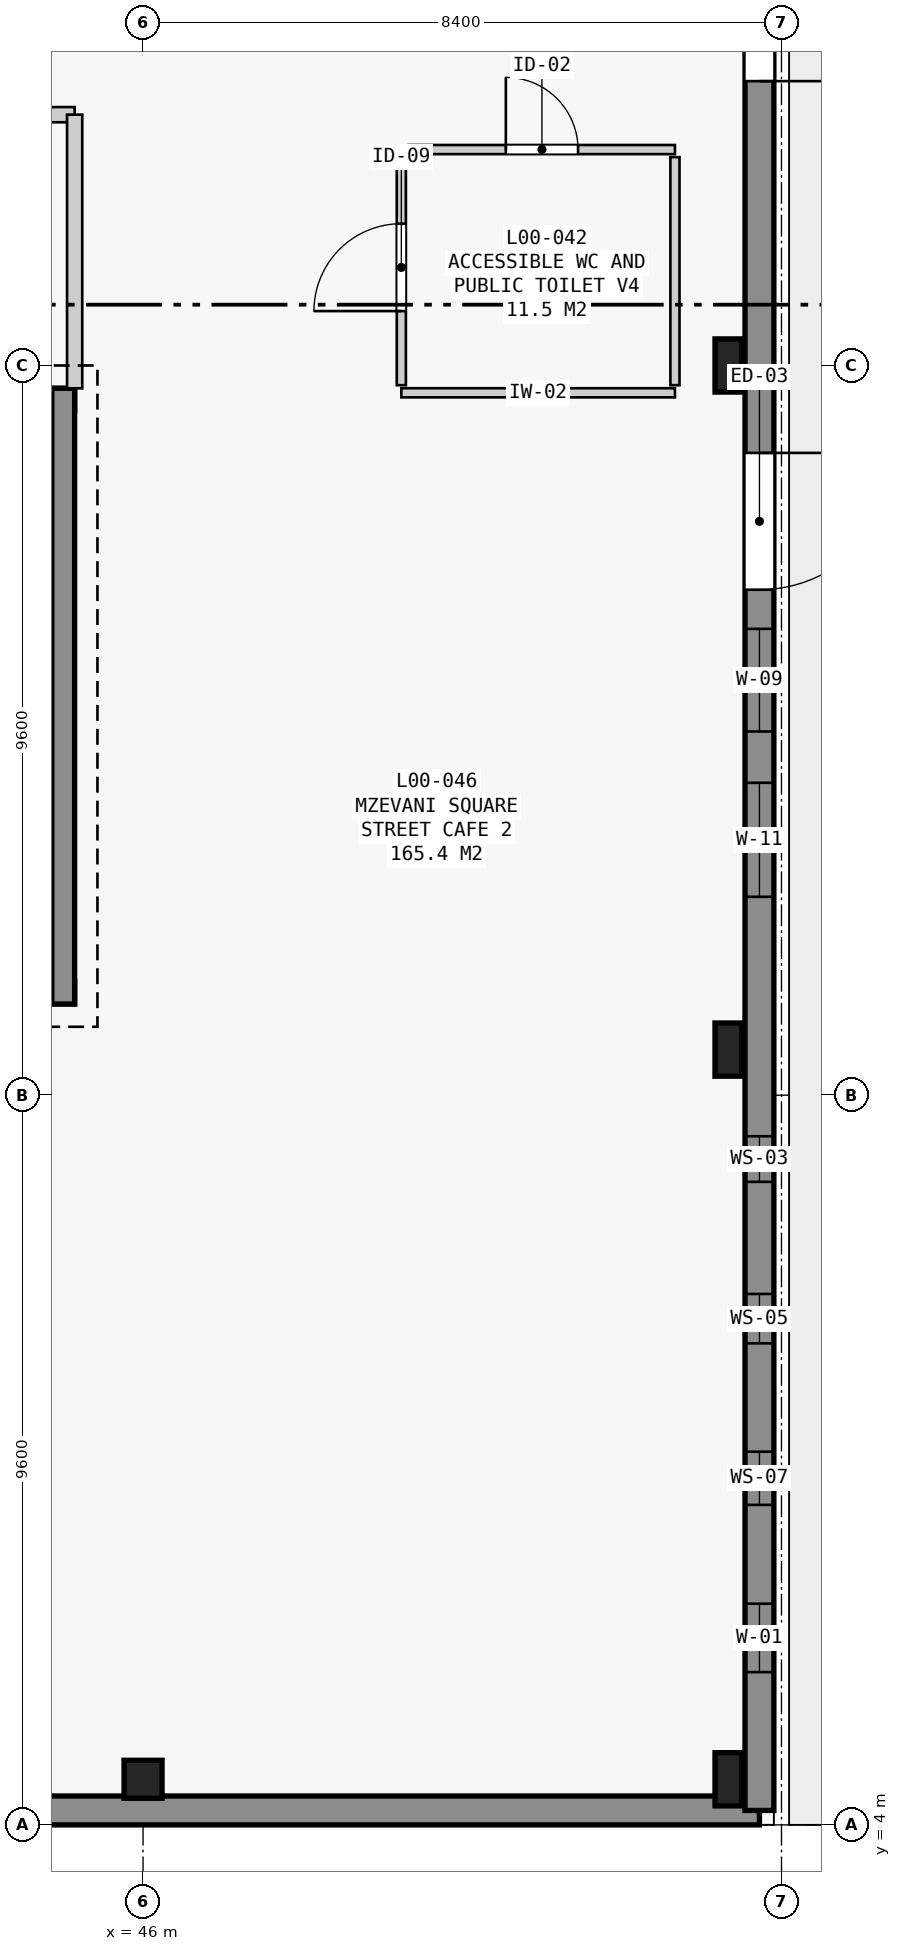
"""IFC4 building model, lengths in metres.
Left out: names, types, materials, properties, quantities, classifications, styles, units other than length and angle.
Written with IfcOpenShell. Run it as: python <this file> out.ifc"""

import sys

from ifc_helpers import new_model, si_unit, direction, frame, frame_2d, origin, origin_2d, place, context, subcontext, project, spatial, rectangle, extrude, element, fill, save


model = new_model("IFC4")
c1 = context("Model", 3, precision=1e-05, world=origin(), true_north=direction((0.0, 1.0)))
c2 = subcontext(c1, "Body", "Model", "MODEL_VIEW")
j1 = project(units=[si_unit("LENGTHUNIT", "METRE"), si_unit("PLANEANGLEUNIT", "RADIAN")], contexts=[c1])
p1 = place(None, origin())
s1 = spatial("IfcSite", under=j1, at=p1, CompositionType="ELEMENT")
p2 = place(p1, origin())
s2 = spatial("IfcBuilding", under=s1, at=p2, CompositionType="ELEMENT")
p3 = place(p2, origin())
s3 = spatial("IfcBuildingStorey", under=s2, at=p3, CompositionType="ELEMENT", Elevation=0.0)
p4 = place(p3, frame((46.0, 4.6, 0.0), z_axis=(0.0, 0.0, 1.0), x_axis=(1.0, 0.0, 0.0)))
e1 = element("IfcColumn", 1, at=p4, inside=s3, PredefinedType="COLUMN", context=c2, shape_type="SweptSolid", body=[
    extrude(rectangle(XDim=0.5, YDim=0.5, at=origin_2d()), origin(), (0.0, 0.0, 1.0), 5.4),
])
for number, where, z_axis, x_axis in (
    (2, (53.7, 4.6, 0.0), (0.0, 0.0, 1.0), (1.0, 0.0, 0.0)),
    (3, (53.7, 14.2, 0.0), (0.0, 0.0, 1.0), (1.0, 0.0, 0.0)),
    (4, (53.7, 23.2, 0.0), (0.0, 0.0, 1.0), (1.0, 0.0, 0.0)),
):
    element("IfcColumn", number, at=place(p3, frame(where, z_axis=z_axis, x_axis=x_axis)), inside=s3, PredefinedType="COLUMN", context=c2, shape_type="SweptSolid", body=[
        extrude(rectangle(XDim=0.35, YDim=0.7, at=origin_2d()), origin(), (0.0, 0.0, 1.0), 5.4),
    ])
p5 = place(p3, frame((54.11, 4.19, 0.0), z_axis=(0.0, 0.0, 1.0), x_axis=(-1.0, 0.0, 0.0)))
e5 = element("IfcWall", 5, at=p5, inside=s3, PredefinedType="STANDARD", context=c2, shape_type="SweptSolid", body=[
    extrude(rectangle(XDim=24.72, YDim=0.38, at=frame_2d((12.36, 0.0))), origin(), (0.0, 0.0, 1.0), 5.14),
])
p6 = place(p5, frame((11.61, 0.0, 0.0)))
e6 = element("IfcOpeningElement", 6, at=p6, cuts=e5, PredefinedType="OPENING", context=c2, shape_type="SweptSolid", body=[
    extrude(rectangle(XDim=1.5, YDim=2.3, at=frame_2d((0.75, 1.15))), frame((0.0, 0.2, 0.0), z_axis=(0.0, -1.0, 0.0), x_axis=(1.0, 0.0, 0.0)), (0.0, 0.0, 1.0), 0.4),
])
p7 = place(p3, frame((54.11, 42.11, 0.0), z_axis=(0.0, 0.0, 1.0), x_axis=(0.0, -1.0, 0.0)))
e7 = element("IfcWall", 7, at=p7, inside=s3, PredefinedType="STANDARD", context=c2, shape_type="SweptSolid", body=[
    extrude(rectangle(XDim=37.92, YDim=0.38, at=frame_2d((18.96, 0.0))), origin(), (0.0, 0.0, 1.0), 5.14),
])
p8 = place(p7, frame((13.669, 0.0, 0.0)))
e8 = element("IfcOpeningElement", 8, at=p8, cuts=e7, PredefinedType="OPENING", context=c2, shape_type="SweptSolid", body=[
    extrude(rectangle(XDim=1.5, YDim=2.3, at=frame_2d((0.75, 1.15))), frame((0.0, 0.2, 0.0), z_axis=(0.0, -1.0, 0.0), x_axis=(1.0, 0.0, 0.0)), (0.0, 0.0, 1.0), 0.4),
])
p9 = place(p7, frame((20.06, 0.0, 0.0)))
e9 = element("IfcOpeningElement", 9, at=p9, cuts=e7, PredefinedType="OPENING", context=c2, shape_type="SweptSolid", body=[
    extrude(rectangle(XDim=1.8, YDim=2.4, at=frame_2d((0.9, 1.2))), frame((0.0, 0.2, 0.0), z_axis=(0.0, -1.0, 0.0), x_axis=(1.0, 0.0, 0.0)), (0.0, 0.0, 1.0), 0.4),
])
p10 = place(p7, frame((1.75, 0.0, 0.95)))
e10 = element("IfcOpeningElement", 10, at=p10, cuts=e7, PredefinedType="OPENING", context=c2, shape_type="SweptSolid", body=[
    extrude(rectangle(XDim=0.6, YDim=1.9, at=frame_2d((0.3, 0.95))), frame((0.0, 0.2, 0.0), z_axis=(0.0, -1.0, 0.0), x_axis=(1.0, 0.0, 0.0)), (0.0, 0.0, 1.0), 0.4),
])
p11 = place(p7, frame((3.825, 0.0, 0.95)))
e11 = element("IfcOpeningElement", 11, at=p11, cuts=e7, PredefinedType="OPENING", context=c2, shape_type="SweptSolid", body=[
    extrude(rectangle(XDim=0.65, YDim=2.0, at=frame_2d((0.325, 1.0))), frame((0.0, 0.2, 0.0), z_axis=(0.0, -1.0, 0.0), x_axis=(1.0, 0.0, 0.0)), (0.0, 0.0, 1.0), 0.4),
])
p12 = place(p7, frame((5.9, 0.0, 0.95)))
e12 = element("IfcOpeningElement", 12, at=p12, cuts=e7, PredefinedType="OPENING", context=c2, shape_type="SweptSolid", body=[
    extrude(rectangle(XDim=0.7, YDim=2.1, at=frame_2d((0.35, 1.05))), frame((0.0, 0.2, 0.0), z_axis=(0.0, -1.0, 0.0), x_axis=(1.0, 0.0, 0.0)), (0.0, 0.0, 1.0), 0.4),
])
p13 = place(p7, frame((10.0, 0.0, 0.95)))
e13 = element("IfcOpeningElement", 13, at=p13, cuts=e7, PredefinedType="OPENING", context=c2, shape_type="SweptSolid", body=[
    extrude(rectangle(XDim=0.9, YDim=2.2, at=frame_2d((0.45, 1.1))), frame((0.0, 0.2, 0.0), z_axis=(0.0, -1.0, 0.0), x_axis=(1.0, 0.0, 0.0)), (0.0, 0.0, 1.0), 0.4),
])
p14 = place(p7, frame((22.375, 0.0, 0.95)))
e14 = element("IfcOpeningElement", 14, at=p14, cuts=e7, PredefinedType="OPENING", context=c2, shape_type="SweptSolid", body=[
    extrude(rectangle(XDim=1.35, YDim=2.5, at=frame_2d((0.675, 1.25))), frame((0.0, 0.2, 0.0), z_axis=(0.0, -1.0, 0.0), x_axis=(1.0, 0.0, 0.0)), (0.0, 0.0, 1.0), 0.4),
])
p15 = place(p7, frame((24.4, 0.0, 0.95)))
e15 = element("IfcOpeningElement", 15, at=p15, cuts=e7, PredefinedType="OPENING", context=c2, shape_type="SweptSolid", body=[
    extrude(rectangle(XDim=1.5, YDim=2.2, at=frame_2d((0.75, 1.1))), frame((0.0, 0.2, 0.0), z_axis=(0.0, -1.0, 0.0), x_axis=(1.0, 0.0, 0.0)), (0.0, 0.0, 1.0), 0.4),
])
p16 = place(p7, frame((29.05, 0.0, 0.95)))
e16 = element("IfcOpeningElement", 16, at=p16, cuts=e7, PredefinedType="OPENING", context=c2, shape_type="SweptSolid", body=[
    extrude(rectangle(XDim=0.6, YDim=1.9, at=frame_2d((0.3, 0.95))), frame((0.0, 0.2, 0.0), z_axis=(0.0, -1.0, 0.0), x_axis=(1.0, 0.0, 0.0)), (0.0, 0.0, 1.0), 0.4),
])
p17 = place(p7, frame((31.125, 0.0, 0.95)))
e17 = element("IfcOpeningElement", 17, at=p17, cuts=e7, PredefinedType="OPENING", context=c2, shape_type="SweptSolid", body=[
    extrude(rectangle(XDim=0.65, YDim=2.0, at=frame_2d((0.325, 1.0))), frame((0.0, 0.2, 0.0), z_axis=(0.0, -1.0, 0.0), x_axis=(1.0, 0.0, 0.0)), (0.0, 0.0, 1.0), 0.4),
])
p18 = place(p7, frame((33.2, 0.0, 0.95)))
e18 = element("IfcOpeningElement", 18, at=p18, cuts=e7, PredefinedType="OPENING", context=c2, shape_type="SweptSolid", body=[
    extrude(rectangle(XDim=0.7, YDim=2.1, at=frame_2d((0.35, 1.05))), frame((0.0, 0.2, 0.0), z_axis=(0.0, -1.0, 0.0), x_axis=(1.0, 0.0, 0.0)), (0.0, 0.0, 1.0), 0.4),
])
p19 = place(p7, frame((35.2, 0.0, 0.95)))
e19 = element("IfcOpeningElement", 19, at=p19, cuts=e7, PredefinedType="OPENING", context=c2, shape_type="SweptSolid", body=[
    extrude(rectangle(XDim=0.9, YDim=1.8, at=frame_2d((0.45, 0.9))), frame((0.0, 0.2, 0.0), z_axis=(0.0, -1.0, 0.0), x_axis=(1.0, 0.0, 0.0)), (0.0, 0.0, 1.0), 0.4),
])
p20 = place(p3, frame((45.1, 14.95, 0.0), z_axis=(0.0, 0.0, 1.0), x_axis=(-1.0, 0.0, 0.0)))
e20 = element("IfcWall", 20, at=p20, inside=s3, PredefinedType="SHEAR", context=c2, shape_type="SweptSolid", body=[
    extrude(rectangle(XDim=6.4, YDim=0.3, at=frame_2d((3.2, 0.0))), origin(), (0.0, 0.0, 1.0), 5.14),
])
p21 = place(p3, frame((38.7, 22.75, 0.0), z_axis=(0.0, 0.0, 1.0), x_axis=(1.0, 0.0, 0.0)))
e21 = element("IfcWall", 21, at=p21, inside=s3, PredefinedType="SHEAR", context=c2, shape_type="SweptSolid", body=[
    extrude(rectangle(XDim=6.4, YDim=0.3, at=frame_2d((3.2, 0.0))), origin(), (0.0, 0.0, 1.0), 5.14),
])
p22 = place(p21, frame((1.25, 0.0, 0.0)))
e22 = element("IfcOpeningElement", 22, at=p22, cuts=e21, PredefinedType="OPENING", context=c2, shape_type="SweptSolid", body=[
    extrude(rectangle(XDim=1.3, YDim=2.2, at=frame_2d((0.65, 1.1))), frame((0.0, 0.16, 0.0), z_axis=(0.0, -1.0, 0.0), x_axis=(1.0, 0.0, 0.0)), (0.0, 0.0, 1.0), 0.32),
])
p23 = place(p21, frame((4.45, 0.0, 0.0)))
e23 = element("IfcOpeningElement", 23, at=p23, cuts=e21, PredefinedType="OPENING", context=c2, shape_type="SweptSolid", body=[
    extrude(rectangle(XDim=1.0, YDim=2.15, at=frame_2d((0.5, 1.075))), frame((0.0, 0.16, 0.0), z_axis=(0.0, -1.0, 0.0), x_axis=(1.0, 0.0, 0.0)), (0.0, 0.0, 1.0), 0.32),
])
p24 = place(p3, frame((44.95, 22.9, 0.0), z_axis=(0.0, 0.0, 1.0), x_axis=(0.0, -1.0, 0.0)))
e24 = element("IfcWall", 24, at=p24, inside=s3, PredefinedType="SHEAR", context=c2, shape_type="SweptSolid", body=[
    extrude(rectangle(XDim=8.1, YDim=0.3, at=frame_2d((4.05, 0.0))), origin(), (0.0, 0.0, 1.0), 5.14),
])
p25 = place(p3, frame((38.7, 26.5, 0.0), z_axis=(0.0, 0.0, 1.0), x_axis=(1.0, 0.0, 0.0)))
e25 = element("IfcWall", 25, at=p25, inside=s3, PredefinedType="STANDARD", context=c2, shape_type="SweptSolid", body=[
    extrude(rectangle(XDim=6.4, YDim=0.2, at=frame_2d((3.2, 0.0))), origin(), (0.0, 0.0, 1.0), 4.67),
])
p26 = place(p25, frame((2.4, 0.0, 0.0)))
e26 = element("IfcOpeningElement", 26, at=p26, cuts=e25, PredefinedType="OPENING", context=c2, shape_type="SweptSolid", body=[
    extrude(rectangle(XDim=1.6, YDim=2.2, at=frame_2d((0.8, 1.1))), frame((0.0, 0.11, 0.0), z_axis=(0.0, -1.0, 0.0), x_axis=(1.0, 0.0, 0.0)), (0.0, 0.0, 1.0), 0.22),
])
p27 = place(p3, frame((45.1, 26.5, 0.0), z_axis=(0.0, 0.0, 1.0), x_axis=(0.0, -1.0, 0.0)))
e27 = element("IfcWall", 27, at=p27, inside=s3, PredefinedType="STANDARD", context=c2, shape_type="SweptSolid", body=[
    extrude(rectangle(XDim=3.6, YDim=0.2, at=frame_2d((1.8, 0.0))), origin(), (0.0, 0.0, 1.0), 4.37),
])
p28 = place(p3, frame((52.998, 22.841, 0.0), z_axis=(0.0, 0.0, 1.0), x_axis=(-1.0, 0.0, 0.0)))
e28 = element("IfcWall", 28, at=p28, inside=s3, PredefinedType="PARTITIONING", context=c2, shape_type="SweptSolid", body=[
    extrude(rectangle(XDim=3.6, YDim=0.12, at=frame_2d((1.8, 0.0))), origin(), (0.0, 0.0, 1.0), 5.14),
])
p29 = place(p3, frame((49.398, 22.941, 0.0), z_axis=(0.0, 0.0, 1.0), x_axis=(0.0, 1.0, 0.0)))
e29 = element("IfcWall", 29, at=p29, inside=s3, PredefinedType="PARTITIONING", context=c2, shape_type="SweptSolid", body=[
    extrude(rectangle(XDim=3.1, YDim=0.12, at=frame_2d((1.55, 0.0))), origin(), (0.0, 0.0, 1.0), 4.37),
])
p30 = place(p29, frame((0.975, 0.0, 0.0)))
e30 = element("IfcOpeningElement", 30, at=p30, cuts=e29, PredefinedType="OPENING", context=c2, shape_type="SweptSolid", body=[
    extrude(rectangle(XDim=1.15, YDim=2.2, at=frame_2d((0.575, 1.1))), frame((0.0, 0.07, 0.0), z_axis=(0.0, -1.0, 0.0), x_axis=(1.0, 0.0, 0.0)), (0.0, 0.0, 1.0), 0.14),
])
p31 = place(p3, frame((49.498, 26.041, 0.0), z_axis=(0.0, 0.0, 1.0), x_axis=(1.0, 0.0, 0.0)))
e31 = element("IfcWall", 31, at=p31, inside=s3, PredefinedType="PARTITIONING", context=c2, shape_type="SweptSolid", body=[
    extrude(rectangle(XDim=3.5, YDim=0.12, at=frame_2d((1.75, 0.0))), origin(), (0.0, 0.0, 1.0), 5.14),
])
p32 = place(p31, frame((1.275, 0.0, 0.0)))
e32 = element("IfcOpeningElement", 32, at=p32, cuts=e31, PredefinedType="OPENING", context=c2, shape_type="SweptSolid", body=[
    extrude(rectangle(XDim=0.95, YDim=2.15, at=frame_2d((0.475, 1.075))), frame((0.0, 0.07, 0.0), z_axis=(0.0, -1.0, 0.0), x_axis=(1.0, 0.0, 0.0)), (0.0, 0.0, 1.0), 0.14),
])
p33 = place(p3, frame((52.998, 25.941, 0.0), z_axis=(0.0, 0.0, 1.0), x_axis=(0.0, -1.0, 0.0)))
e33 = element("IfcWall", 33, at=p33, inside=s3, PredefinedType="PARTITIONING", context=c2, shape_type="SweptSolid", body=[
    extrude(rectangle(XDim=3.0, YDim=0.12, at=frame_2d((1.5, 0.0))), origin(), (0.0, 0.0, 1.0), 4.37),
])
p34 = place(p8, origin())
e34 = element("IfcDoor", 34, at=p34, inside=s3, OperationType="SINGLE_SWING_RIGHT", PredefinedType="DOOR", context=c2, shape_type="SweptSolid", body=[
    extrude(rectangle(XDim=1.5, YDim=2.3, at=frame_2d((0.75, 1.15))), frame((0.0, 0.025, 0.0), z_axis=(0.0, -1.0, 0.0), x_axis=(1.0, 0.0, 0.0)), (0.0, 0.0, 1.0), 0.05),
])
fill(e8, e34)
p35 = place(p9, origin())
e35 = element("IfcDoor", 35, at=p35, inside=s3, OperationType="SINGLE_SWING_LEFT", PredefinedType="DOOR", context=c2, shape_type="SweptSolid", body=[
    extrude(rectangle(XDim=1.8, YDim=2.4, at=frame_2d((0.9, 1.2))), frame((0.0, 0.025, 0.0), z_axis=(0.0, -1.0, 0.0), x_axis=(1.0, 0.0, 0.0)), (0.0, 0.0, 1.0), 0.05),
])
fill(e9, e35)
p36 = place(p14, origin())
e36 = element("IfcWindow", 36, at=p36, inside=s3, PartitioningType="SINGLE_PANEL", PredefinedType="WINDOW", context=c2, shape_type="SweptSolid", body=[
    extrude(rectangle(XDim=1.35, YDim=2.5, at=frame_2d((0.675, 1.25))), frame((0.0, 0.03, 0.0), z_axis=(0.0, -1.0, 0.0), x_axis=(1.0, 0.0, 0.0)), (0.0, 0.0, 1.0), 0.06),
])
fill(e14, e36)
p37 = place(p15, origin())
e37 = element("IfcWindow", 37, at=p37, inside=s3, PartitioningType="SINGLE_PANEL", PredefinedType="WINDOW", context=c2, shape_type="SweptSolid", body=[
    extrude(rectangle(XDim=1.5, YDim=2.2, at=frame_2d((0.75, 1.1))), frame((0.0, 0.03, 0.0), z_axis=(0.0, -1.0, 0.0), x_axis=(1.0, 0.0, 0.0)), (0.0, 0.0, 1.0), 0.06),
])
fill(e15, e37)
p38 = place(p16, origin())
e38 = element("IfcWindow", 38, at=p38, inside=s3, PartitioningType="SINGLE_PANEL", PredefinedType="WINDOW", context=c2, shape_type="SweptSolid", body=[
    extrude(rectangle(XDim=0.6, YDim=1.9, at=frame_2d((0.3, 0.95))), frame((0.0, 0.03, 0.0), z_axis=(0.0, -1.0, 0.0), x_axis=(1.0, 0.0, 0.0)), (0.0, 0.0, 1.0), 0.06),
])
fill(e16, e38)
p39 = place(p17, origin())
e39 = element("IfcWindow", 39, at=p39, inside=s3, PartitioningType="SINGLE_PANEL", PredefinedType="WINDOW", context=c2, shape_type="SweptSolid", body=[
    extrude(rectangle(XDim=0.65, YDim=2.0, at=frame_2d((0.325, 1.0))), frame((0.0, 0.03, 0.0), z_axis=(0.0, -1.0, 0.0), x_axis=(1.0, 0.0, 0.0)), (0.0, 0.0, 1.0), 0.06),
])
fill(e17, e39)
p40 = place(p18, origin())
e40 = element("IfcWindow", 40, at=p40, inside=s3, PartitioningType="SINGLE_PANEL", PredefinedType="WINDOW", context=c2, shape_type="SweptSolid", body=[
    extrude(rectangle(XDim=0.7, YDim=2.1, at=frame_2d((0.35, 1.05))), frame((0.0, 0.03, 0.0), z_axis=(0.0, -1.0, 0.0), x_axis=(1.0, 0.0, 0.0)), (0.0, 0.0, 1.0), 0.06),
])
fill(e18, e40)
p41 = place(p19, origin())
e41 = element("IfcWindow", 41, at=p41, inside=s3, PartitioningType="SINGLE_PANEL", PredefinedType="WINDOW", context=c2, shape_type="SweptSolid", body=[
    extrude(rectangle(XDim=0.9, YDim=1.8, at=frame_2d((0.45, 0.9))), frame((0.0, 0.03, 0.0), z_axis=(0.0, -1.0, 0.0), x_axis=(1.0, 0.0, 0.0)), (0.0, 0.0, 1.0), 0.06),
])
fill(e19, e41)
p42 = place(p32, origin())
e42 = element("IfcDoor", 42, at=p42, inside=s3, OperationType="SINGLE_SWING_LEFT", PredefinedType="DOOR", context=c2, shape_type="SweptSolid", body=[
    extrude(rectangle(XDim=0.95, YDim=2.15, at=frame_2d((0.475, 1.075))), frame((0.0, 0.025, 0.0), z_axis=(0.0, -1.0, 0.0), x_axis=(1.0, 0.0, 0.0)), (0.0, 0.0, 1.0), 0.05),
])
fill(e32, e42)
p43 = place(p30, origin())
e43 = element("IfcDoor", 43, at=p43, inside=s3, OperationType="SINGLE_SWING_LEFT", PredefinedType="DOOR", context=c2, shape_type="SweptSolid", body=[
    extrude(rectangle(XDim=1.15, YDim=2.2, at=frame_2d((0.575, 1.1))), frame((0.0, 0.025, 0.0), z_axis=(0.0, -1.0, 0.0), x_axis=(1.0, 0.0, 0.0)), (0.0, 0.0, 1.0), 0.05),
])
fill(e30, e43)
save(model, sys.argv[1])
